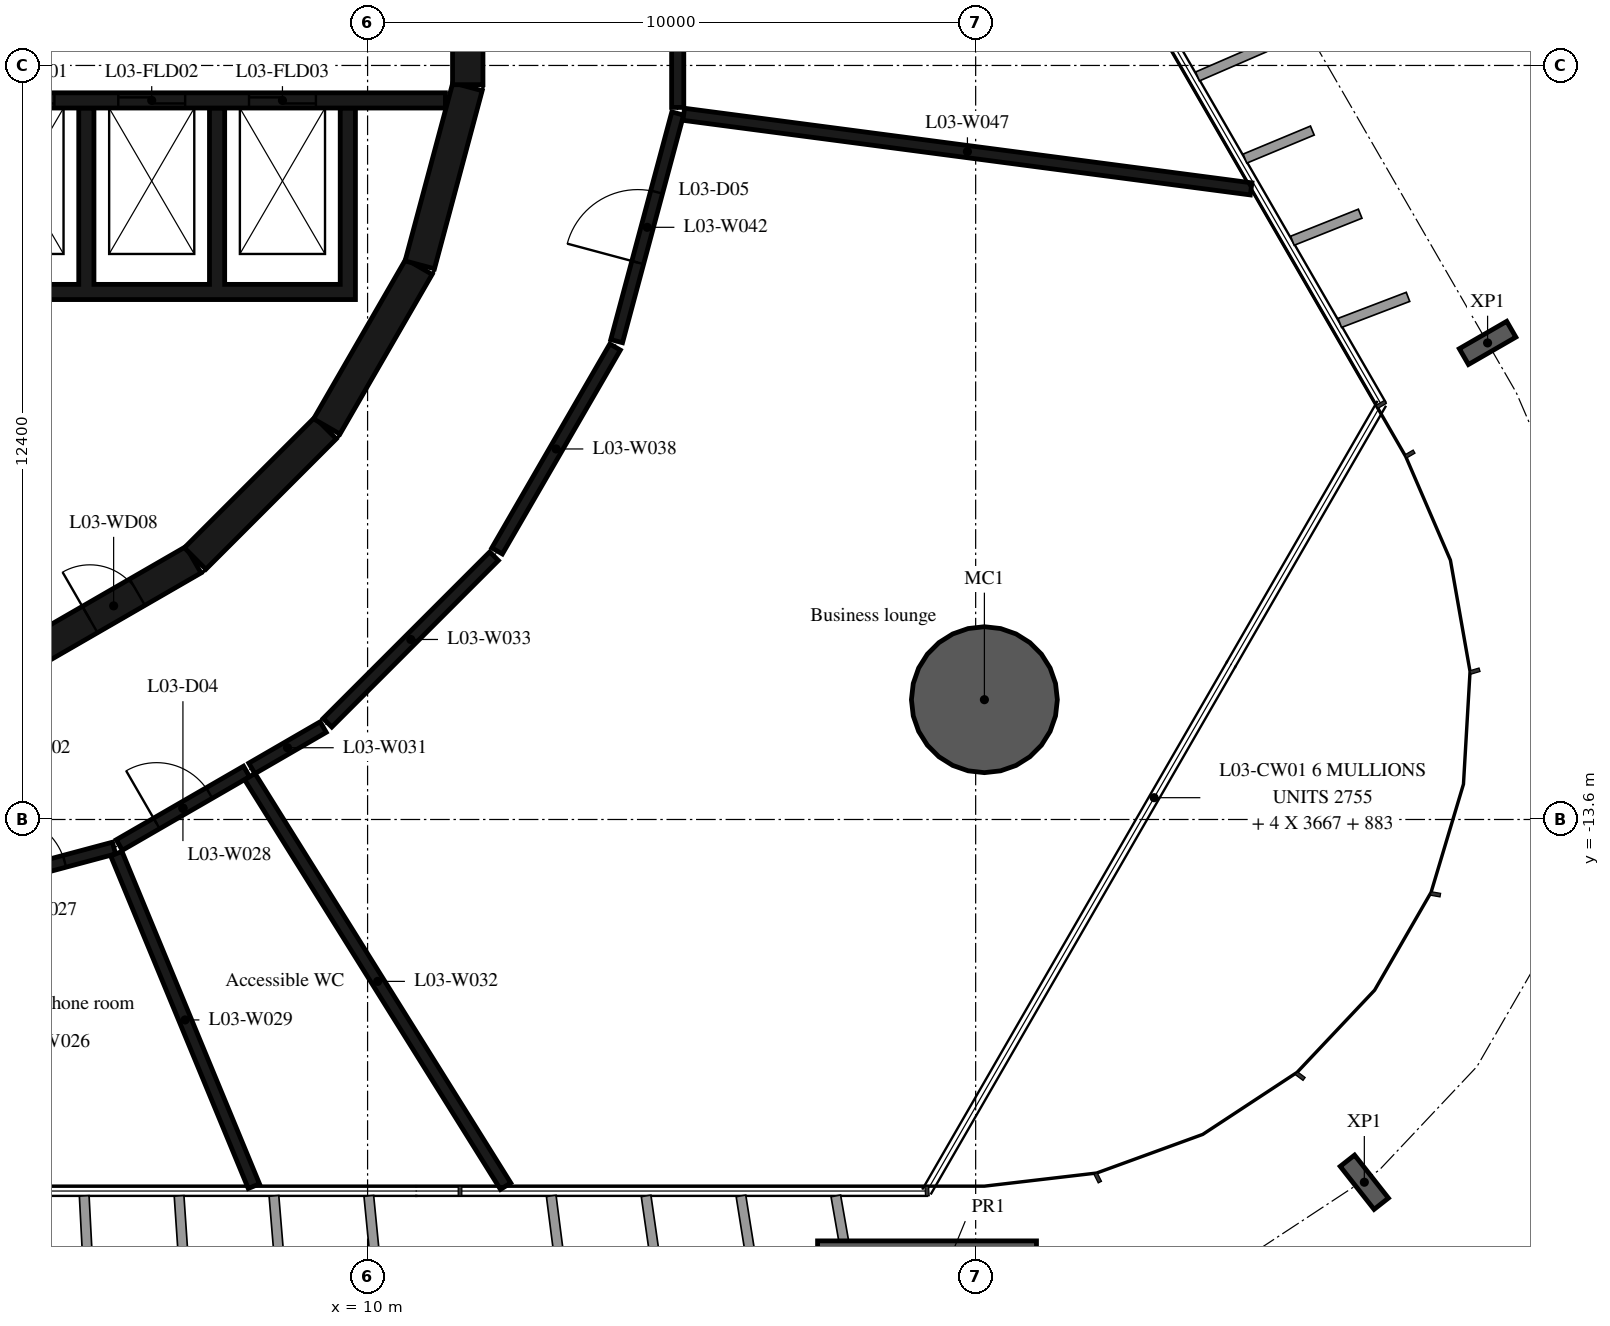
"""IFC4 building model, lengths in metres.
Left out: names, types, materials, properties, quantities, classifications, styles, units other than length and angle.
Written with IfcOpenShell. Run it as: python <this file> out.ifc"""

import sys

from ifc_helpers import new_model, si_unit, direction, frame, frame_2d, origin, origin_2d, place, context, subcontext, project, spatial, polyline, rectangle, hollow_circle, i_section, outline, extrude, element, fill, save


model = new_model("IFC4")
c1 = context("Model", 3, precision=1e-05, world=origin(), true_north=direction((0.0, 1.0)))
c2 = subcontext(c1, "Body", "Model", "MODEL_VIEW")
j1 = project(units=[si_unit("LENGTHUNIT", "METRE"), si_unit("PLANEANGLEUNIT", "RADIAN")], contexts=[c1])
p1 = place(None, origin())
s1 = spatial("IfcSite", under=j1, at=p1, CompositionType="ELEMENT")
p2 = place(p1, origin())
s2 = spatial("IfcBuilding", under=s1, at=p2, CompositionType="ELEMENT")
p3 = place(p2, frame((0.0, 0.0, 18.6)))
s3 = spatial("IfcBuildingStorey", under=s2, at=p3, CompositionType="ELEMENT", Elevation=18.6)
p4 = place(p3, frame((20.144, -11.63, -0.38), z_axis=(0.0, 0.0, 1.0), x_axis=(1.0, 0.0, 0.0)))
e1 = element("IfcColumn", 1, at=p4, inside=s3, PredefinedType="COLUMN", context=c2, shape_type="SweptSolid", body=[
    extrude(hollow_circle(Radius=1.2, WallThickness=0.06, at=origin_2d()), origin(), (0.0, 0.0, 1.0), 4.8),
])
for number, where, z_axis, x_axis in (
    (2, (26.392, -19.565, -0.38), (0.0, 0.0, 1.0), (-0.786, -0.619, 0.0)),
    (3, (28.419, -5.763, -0.38), (0.0, 0.0, 1.0), (0.5, -0.866, 0.0)),
):
    element("IfcColumn", number, at=place(p3, frame(where, z_axis=z_axis, x_axis=x_axis)), inside=s3, PredefinedType="COLUMN", context=c2, shape_type="SweptSolid", body=[
        extrude(i_section(OverallWidth=0.3, OverallDepth=0.9, WebThickness=0.019, FlangeThickness=0.035, FilletRadius=0.03, at=origin_2d()), origin(), (0.0, 0.0, 1.0), 4.8),
    ])
p5 = place(p3, frame((19.2, -21.73, -0.38), z_axis=(0.0, 0.0, 1.0), x_axis=(1.0, 0.0, 0.0)))
e4 = element("IfcColumn", 4, at=p5, inside=s3, PredefinedType="COLUMN", context=c2, shape_type="SweptSolid", body=[
    extrude(rectangle(XDim=3.6, YDim=2.4, at=origin_2d()), origin(), (0.0, 0.0, 1.0), 4.8),
])
p6 = place(p3, frame((4.51, -10.845, 0.0), z_axis=(0.0, 0.0, 1.0), x_axis=(0.865975092491, 0.500087131594, 0.0)))
e5 = element("IfcWall", 5, at=p6, inside=s3, PredefinedType="SHEAR", context=c2, shape_type="SweptSolid", body=[
    extrude(rectangle(XDim=3.033, YDim=0.5, at=frame_2d((1.516, 0.0))), origin(), (0.0, 0.0, 1.0), 4.42),
])
p7 = place(p6, frame((1.066, 0.0, 0.0)))
e6 = element("IfcOpeningElement", 6, at=p7, cuts=e5, PredefinedType="OPENING", context=c2, shape_type="SweptSolid", body=[
    extrude(rectangle(XDim=0.9, YDim=2.1, at=frame_2d((0.45, 1.05))), frame((0.0, 0.26, 0.0), z_axis=(0.0, -1.0, 0.0), x_axis=(1.0, 0.0, 0.0)), (0.0, 0.0, 1.0), 0.52),
])
p8 = place(p3, frame((7.164, -9.308, 0.0), z_axis=(0.0, 0.0, 1.0), x_axis=(0.707106781187, 0.707106781187, 0.0)))
e7 = element("IfcWall", 7, at=p8, inside=s3, PredefinedType="SHEAR", context=c2, shape_type="SweptSolid", body=[
    extrude(rectangle(XDim=3.032, YDim=0.5, at=frame_2d((1.516, 0.0))), origin(), (0.0, 0.0, 1.0), 4.42),
])
for number, where, z_axis, x_axis in (
    (8, (9.329, -7.137, 0.0), (0.0, 0.0, 1.0), (0.5, 0.866, 0.0)),
    (9, (10.858, -4.479, 0.0), (0.0, 0.0, 1.0), (0.259, 0.966, 0.0)),
):
    element("IfcWall", number, at=place(p3, frame(where, z_axis=z_axis, x_axis=x_axis)), inside=s3, PredefinedType="SHEAR", context=c2, shape_type="SweptSolid", body=[
        extrude(rectangle(XDim=3.033, YDim=0.5, at=frame_2d((1.516, 0.0))), origin(), (0.0, 0.0, 1.0), 4.42),
    ])
p9 = place(p3, frame((11.647, -1.516, 0.0), z_axis=(0.0, 0.0, 1.0), x_axis=(0.0, 1.0, 0.0)))
e10 = element("IfcWall", 10, at=p9, inside=s3, PredefinedType="SHEAR", context=c2, shape_type="SweptSolid", body=[
    extrude(rectangle(XDim=3.033, YDim=0.5, at=frame_2d((1.516, 0.0))), origin(), (0.0, 0.0, 1.0), 4.42),
])
p10 = place(p9, frame((0.616, 0.0, 0.0)))
e11 = element("IfcOpeningElement", 11, at=p10, cuts=e10, PredefinedType="OPENING", context=c2, shape_type="SweptSolid", body=[
    extrude(rectangle(XDim=1.8, YDim=2.1, at=frame_2d((0.9, 1.05))), frame((0.0, 0.26, 0.0), z_axis=(0.0, -1.0, 0.0), x_axis=(1.0, 0.0, 0.0)), (0.0, 0.0, 1.0), 0.52),
])
p11 = place(p3, origin())
e12 = element("IfcWall", 12, at=p11, inside=s3, PredefinedType="SHEAR", context=c2, shape_type="SweptSolid", body=[
    extrude(outline(polyline([(9.8, -5.05), (9.8, -4.8), (9.8, -1.9), (9.55, -1.9), (9.55, -4.8), (7.65, -4.8), (7.65, -1.9), (7.4, -1.9), (7.4, -4.8), (5.5, -4.8), (5.5, -1.9), (5.25, -1.9), (5.25, -4.8), (3.35, -4.8), (3.35, -1.9), (3.1, -1.9), (3.1, -4.8), (-5.25, -4.8), (-5.25, -1.9), (-5.5, -1.9), (-5.5, -4.8), (-7.4, -4.8), (-7.4, -1.9), (-7.65, -1.9), (-7.65, -4.8), (-9.55, -4.8), (-9.55, -1.9), (-9.8, -1.9), (-9.8, -4.8), (-9.8, -5.05), (9.8, -5.05)])), origin(), (0.0, 0.0, 1.0), 4.42),
])
p12 = place(p3, frame((3.35, -1.775, 0.0), z_axis=(0.0, 0.0, 1.0), x_axis=(1.0, 0.0, 0.0)))
e13 = element("IfcWall", 13, at=p12, inside=s3, PredefinedType="SHEAR", context=c2, shape_type="SweptSolid", body=[
    extrude(rectangle(XDim=7.93, YDim=0.25, at=frame_2d((3.965, 0.0))), origin(), (0.0, 0.0, 1.0), 4.42),
])
p13 = place(p12, frame((0.4, 0.0, 0.0)))
e14 = element("IfcOpeningElement", 14, at=p13, cuts=e13, PredefinedType="OPENING", context=c2, shape_type="SweptSolid", body=[
    extrude(rectangle(XDim=1.1, YDim=2.4, at=frame_2d((0.55, 1.2))), frame((0.0, 0.135, 0.0), z_axis=(0.0, -1.0, 0.0), x_axis=(1.0, 0.0, 0.0)), (0.0, 0.0, 1.0), 0.27),
])
p14 = place(p12, frame((2.55, 0.0, 0.0)))
e15 = element("IfcOpeningElement", 15, at=p14, cuts=e13, PredefinedType="OPENING", context=c2, shape_type="SweptSolid", body=[
    extrude(rectangle(XDim=1.1, YDim=2.4, at=frame_2d((0.55, 1.2))), frame((0.0, 0.135, 0.0), z_axis=(0.0, -1.0, 0.0), x_axis=(1.0, 0.0, 0.0)), (0.0, 0.0, 1.0), 0.27),
])
p15 = place(p12, frame((4.7, 0.0, 0.0)))
e16 = element("IfcOpeningElement", 16, at=p15, cuts=e13, PredefinedType="OPENING", context=c2, shape_type="SweptSolid", body=[
    extrude(rectangle(XDim=1.1, YDim=2.4, at=frame_2d((0.55, 1.2))), frame((0.0, 0.135, 0.0), z_axis=(0.0, -1.0, 0.0), x_axis=(1.0, 0.0, 0.0)), (0.0, 0.0, 1.0), 0.27),
])
p16 = place(p3, frame((3.237, -14.764, 0.0), z_axis=(0.0, 0.0, 1.0), x_axis=(0.966003629213, 0.25852850587, 0.0)))
e17 = element("IfcWall", 17, at=p16, inside=s3, PredefinedType="PARTITIONING", context=c2, shape_type="SweptSolid", body=[
    extrude(rectangle(XDim=2.685, YDim=0.2, at=frame_2d((1.342, 0.0))), origin(), (0.0, 0.0, 1.0), 4.42),
])
p17 = place(p16, frame((0.842, 0.0, 0.0)))
e18 = element("IfcOpeningElement", 18, at=p17, cuts=e17, PredefinedType="OPENING", context=c2, shape_type="SweptSolid", body=[
    extrude(rectangle(XDim=1.0, YDim=2.1, at=frame_2d((0.5, 1.05))), frame((0.0, 0.11, 0.0), z_axis=(0.0, -1.0, 0.0), x_axis=(1.0, 0.0, 0.0)), (0.0, 0.0, 1.0), 0.22),
])
p18 = place(p3, frame((5.917, -14.02, 0.0), z_axis=(0.0, 0.0, 1.0), x_axis=(0.865797030805, 0.500395345151, 0.0)))
e19 = element("IfcWall", 19, at=p18, inside=s3, PredefinedType="PARTITIONING", context=c2, shape_type="SweptSolid", body=[
    extrude(rectangle(XDim=2.418, YDim=0.2, at=frame_2d((1.209, 0.0))), origin(), (0.0, 0.0, 1.0), 4.42),
])
p19 = place(p18, frame((0.709, 0.0, 0.0)))
e20 = element("IfcOpeningElement", 20, at=p19, cuts=e19, PredefinedType="OPENING", context=c2, shape_type="SweptSolid", body=[
    extrude(rectangle(XDim=1.0, YDim=2.1, at=frame_2d((0.5, 1.05))), frame((0.0, 0.11, 0.0), z_axis=(0.0, -1.0, 0.0), x_axis=(1.0, 0.0, 0.0)), (0.0, 0.0, 1.0), 0.22),
])
p20 = place(p3, frame((5.868, -14.162, 0.0), z_axis=(0.0, 0.0, 1.0), x_axis=(0.382249745869, -0.924059052108, 0.0)))
e21 = element("IfcWall", 21, at=p20, inside=s3, PredefinedType="PARTITIONING", context=c2, shape_type="SweptSolid", body=[
    extrude(rectangle(XDim=5.917, YDim=0.2, at=frame_2d((2.958, 0.0))), origin(), (0.0, 0.0, 1.0), 4.42),
])
p21 = place(p3, frame((8.096, -12.76, 0.0), z_axis=(0.0, 0.0, 1.0), x_axis=(0.865348217229, 0.501171091484, 0.0)))
e22 = element("IfcWall", 22, at=p21, inside=s3, PredefinedType="PARTITIONING", context=c2, shape_type="SweptSolid", body=[
    extrude(rectangle(XDim=1.356, YDim=0.2, at=frame_2d((0.678, 0.0))), origin(), (0.0, 0.0, 1.0), 4.42),
])
p22 = place(p3, frame((8.063, -12.895, 0.0), z_axis=(0.0, 0.0, 1.0), x_axis=(0.529780605496, -0.848134723992, 0.0)))
e23 = element("IfcWall", 23, at=p22, inside=s3, PredefinedType="PARTITIONING", context=c2, shape_type="SweptSolid", body=[
    extrude(rectangle(XDim=7.941, YDim=0.2, at=frame_2d((3.971, 0.0))), origin(), (0.0, 0.0, 1.0), 4.42),
])
p23 = place(p3, frame((9.341, -12.009, 0.0), z_axis=(0.0, 0.0, 1.0), x_axis=(0.707106781187, 0.707106781187, 0.0)))
e24 = element("IfcWall", 24, at=p23, inside=s3, PredefinedType="PARTITIONING", context=c2, shape_type="SweptSolid", body=[
    extrude(rectangle(XDim=3.874, YDim=0.2, at=frame_2d((1.937, 0.0))), origin(), (0.0, 0.0, 1.0), 4.42),
])
p24 = place(p3, frame((12.13, -9.183, 0.0), z_axis=(0.0, 0.0, 1.0), x_axis=(0.500760497952, 0.865585884642, 0.0)))
e25 = element("IfcWall", 25, at=p24, inside=s3, PredefinedType="PARTITIONING", context=c2, shape_type="SweptSolid", body=[
    extrude(rectangle(XDim=3.874, YDim=0.2, at=frame_2d((1.937, 0.0))), origin(), (0.0, 0.0, 1.0), 4.42),
])
p25 = place(p3, frame((14.096, -5.733, 0.0), z_axis=(0.0, 0.0, 1.0), x_axis=(0.259085569159, 0.96585437197, 0.0)))
e26 = element("IfcWall", 26, at=p25, inside=s3, PredefinedType="PARTITIONING", context=c2, shape_type="SweptSolid", body=[
    extrude(rectangle(XDim=3.876, YDim=0.2, at=frame_2d((1.938, 0.0))), origin(), (0.0, 0.0, 1.0), 4.42),
])
p26 = place(p25, frame((1.338, 0.0, 0.0)))
e27 = element("IfcOpeningElement", 27, at=p26, cuts=e26, PredefinedType="OPENING", context=c2, shape_type="SweptSolid", body=[
    extrude(rectangle(XDim=1.2, YDim=2.1, at=frame_2d((0.6, 1.05))), frame((0.0, 0.11, 0.0), z_axis=(0.0, -1.0, 0.0), x_axis=(1.0, 0.0, 0.0)), (0.0, 0.0, 1.0), 0.22),
])
p27 = place(p3, frame((15.1, -1.89, 0.0), z_axis=(0.0, 0.0, 1.0), x_axis=(0.0, 1.0, 0.0)))
e28 = element("IfcWall", 28, at=p27, inside=s3, PredefinedType="PARTITIONING", context=c2, shape_type="SweptSolid", body=[
    extrude(rectangle(XDim=3.88, YDim=0.2, at=frame_2d((1.94, 0.0))), origin(), (0.0, 0.0, 1.0), 4.42),
])
p28 = place(p27, frame((1.44, 0.0, 0.0)))
e29 = element("IfcOpeningElement", 29, at=p28, cuts=e28, PredefinedType="OPENING", context=c2, shape_type="SweptSolid", body=[
    extrude(rectangle(XDim=1.0, YDim=2.1, at=frame_2d((0.5, 1.05))), frame((0.0, 0.11, 0.0), z_axis=(0.0, -1.0, 0.0), x_axis=(1.0, 0.0, 0.0)), (0.0, 0.0, 1.0), 0.22),
])
p29 = place(p3, frame((15.199, -2.003, 0.0), z_axis=(0.0, 0.0, 1.0), x_axis=(0.991463740717, -0.130382709146, 0.0)))
e30 = element("IfcWall", 30, at=p29, inside=s3, PredefinedType="PARTITIONING", context=c2, shape_type="SweptSolid", body=[
    extrude(rectangle(XDim=9.411, YDim=0.2, at=frame_2d((4.706, 0.0))), origin(), (0.0, 0.0, 1.0), 4.42),
])
p30 = place(p13, origin())
e31 = element("IfcDoor", 31, at=p30, inside=s3, OperationType="DOUBLE_DOOR_SLIDING", PredefinedType="DOOR", context=c2, shape_type="SweptSolid", body=[
    extrude(rectangle(XDim=1.1, YDim=2.4, at=frame_2d((0.55, 1.2))), frame((0.0, 0.025, 0.0), z_axis=(0.0, -1.0, 0.0), x_axis=(1.0, 0.0, 0.0)), (0.0, 0.0, 1.0), 0.05),
])
fill(e14, e31)
p31 = place(p14, origin())
e32 = element("IfcDoor", 32, at=p31, inside=s3, OperationType="DOUBLE_DOOR_SLIDING", PredefinedType="DOOR", context=c2, shape_type="SweptSolid", body=[
    extrude(rectangle(XDim=1.1, YDim=2.4, at=frame_2d((0.55, 1.2))), frame((0.0, 0.025, 0.0), z_axis=(0.0, -1.0, 0.0), x_axis=(1.0, 0.0, 0.0)), (0.0, 0.0, 1.0), 0.05),
])
fill(e15, e32)
p32 = place(p15, origin())
e33 = element("IfcDoor", 33, at=p32, inside=s3, OperationType="DOUBLE_DOOR_SLIDING", PredefinedType="DOOR", context=c2, shape_type="SweptSolid", body=[
    extrude(rectangle(XDim=1.1, YDim=2.4, at=frame_2d((0.55, 1.2))), frame((0.0, 0.025, 0.0), z_axis=(0.0, -1.0, 0.0), x_axis=(1.0, 0.0, 0.0)), (0.0, 0.0, 1.0), 0.05),
])
fill(e16, e33)
p33 = place(p7, origin())
e34 = element("IfcDoor", 34, at=p33, inside=s3, OperationType="SINGLE_SWING_LEFT", PredefinedType="DOOR", context=c2, shape_type="SweptSolid", body=[
    extrude(rectangle(XDim=0.9, YDim=2.1, at=frame_2d((0.45, 1.05))), frame((0.0, 0.025, 0.0), z_axis=(0.0, -1.0, 0.0), x_axis=(1.0, 0.0, 0.0)), (0.0, 0.0, 1.0), 0.05),
])
fill(e6, e34)
p34 = place(p17, origin())
e35 = element("IfcDoor", 35, at=p34, inside=s3, OperationType="SINGLE_SWING_LEFT", PredefinedType="DOOR", context=c2, shape_type="SweptSolid", body=[
    extrude(rectangle(XDim=1.0, YDim=2.1, at=frame_2d((0.5, 1.05))), frame((0.0, 0.025, 0.0), z_axis=(0.0, -1.0, 0.0), x_axis=(1.0, 0.0, 0.0)), (0.0, 0.0, 1.0), 0.05),
])
fill(e18, e35)
p35 = place(p19, origin())
e36 = element("IfcDoor", 36, at=p35, inside=s3, OperationType="SINGLE_SWING_LEFT", PredefinedType="DOOR", context=c2, shape_type="SweptSolid", body=[
    extrude(rectangle(XDim=1.0, YDim=2.1, at=frame_2d((0.5, 1.05))), frame((0.0, 0.025, 0.0), z_axis=(0.0, -1.0, 0.0), x_axis=(1.0, 0.0, 0.0)), (0.0, 0.0, 1.0), 0.05),
])
fill(e20, e36)
p36 = place(p26, origin())
e37 = element("IfcDoor", 37, at=p36, inside=s3, OperationType="SINGLE_SWING_LEFT", PredefinedType="DOOR", context=c2, shape_type="SweptSolid", body=[
    extrude(rectangle(XDim=1.2, YDim=2.1, at=frame_2d((0.6, 1.05))), frame((0.0, 0.025, 0.0), z_axis=(0.0, -1.0, 0.0), x_axis=(1.0, 0.0, 0.0)), (0.0, 0.0, 1.0), 0.05),
])
fill(e27, e37)
save(model, sys.argv[1])
